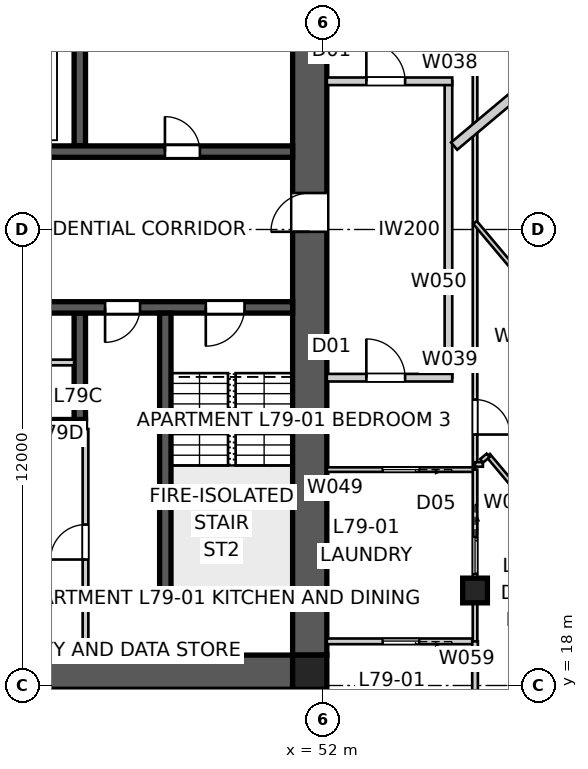
"""IFC4 building model, lengths in metres.
Left out: names, types, materials, properties, quantities, classifications, styles, units other than length and angle.
Written with IfcOpenShell. Run it as: python <this file> out.ifc"""

import sys

from ifc_helpers import new_model, si_unit, direction, frame, frame_2d, origin, origin_2d, place, context, subcontext, project, spatial, polyline, rectangle, outline, extrude, element, fill, save


model = new_model("IFC4")
c1 = context("Model", 3, precision=1e-05, world=origin(), true_north=direction((0.0, 1.0)))
c2 = subcontext(c1, "Body", "Model", "MODEL_VIEW")
j1 = project(units=[si_unit("LENGTHUNIT", "METRE"), si_unit("PLANEANGLEUNIT", "RADIAN")], contexts=[c1])
p1 = place(None, origin())
s1 = spatial("IfcSite", under=j1, at=p1, CompositionType="ELEMENT")
p2 = place(p1, origin())
s2 = spatial("IfcBuilding", under=s1, at=p2, CompositionType="ELEMENT")
p3 = place(p2, frame((0.0, 0.0, 286.2)))
s3 = spatial("IfcBuildingStorey", under=s2, at=p3, CompositionType="ELEMENT", Elevation=286.2)
p4 = place(p3, frame((51.2, 18.35, 0.0), z_axis=(0.0, 0.0, 1.0), x_axis=(-1.0, 0.0, 0.0)))
e1 = element("IfcWall", 1, at=p4, inside=s3, PredefinedType="SHEAR", context=c2, shape_type="SweptSolid", body=[
    extrude(outline(polyline([(0.0, -0.45), (22.4, -0.45), (22.4, -0.025), (22.85, -0.025), (22.85, 0.025), (22.4, 0.025), (22.4, 0.45), (0.0, 0.45), (0.0, 0.025), (-0.45, 0.025), (-0.45, -0.025), (0.0, -0.025), (0.0, -0.45)])), origin(), (0.0, 0.0, 1.0), 3.4),
])
p5 = place(p3, frame((51.65, 18.8, 0.0), z_axis=(0.0, 0.0, 1.0), x_axis=(0.0, 1.0, 0.0)))
e2 = element("IfcWall", 2, at=p5, inside=s3, PredefinedType="SHEAR", context=c2, shape_type="SweptSolid", body=[
    extrude(outline(polyline([(0.0, -0.45), (22.4, -0.45), (22.4, -0.025), (22.85, -0.025), (22.85, 0.025), (22.4, 0.025), (22.4, 0.45), (0.0, 0.45), (0.0, 0.025), (-0.45, 0.025), (-0.45, -0.025), (0.0, -0.025), (0.0, -0.45)])), origin(), (0.0, 0.0, 1.0), 3.4),
])
p6 = place(p5, frame((11.14, 0.0, 0.0)))
e3 = element("IfcOpeningElement", 3, at=p6, cuts=e2, PredefinedType="OPENING", context=c2, shape_type="SweptSolid", body=[
    extrude(rectangle(XDim=1.02, YDim=2.4, at=frame_2d((0.51, 1.2))), frame((0.0, 0.46, 0.0), z_axis=(0.0, -1.0, 0.0), x_axis=(1.0, 0.0, 0.0)), (0.0, 0.0, 1.0), 0.92),
])
p7 = place(p3, frame((28.8, 32.05, 0.0), z_axis=(0.0, 0.0, 1.0), x_axis=(1.0, 0.0, 0.0)))
e4 = element("IfcWall", 4, at=p7, inside=s3, PredefinedType="SHEAR", context=c2, shape_type="SweptSolid", body=[
    extrude(rectangle(XDim=22.4, YDim=0.3, at=frame_2d((11.2, 0.0))), origin(), (0.0, 0.0, 1.0), 3.4),
])
p8 = place(p7, frame((19.04, 0.0, 0.0)))
e5 = element("IfcOpeningElement", 5, at=p8, cuts=e4, PredefinedType="OPENING", context=c2, shape_type="SweptSolid", body=[
    extrude(rectangle(XDim=0.92, YDim=2.1, at=frame_2d((0.46, 1.05))), frame((0.0, 0.16, 0.0), z_axis=(0.0, -1.0, 0.0), x_axis=(1.0, 0.0, 0.0)), (0.0, 0.0, 1.0), 0.32),
])
p9 = place(p7, frame((1.265, 0.0, 0.0)))
e6 = element("IfcOpeningElement", 6, at=p9, cuts=e4, PredefinedType="OPENING", context=c2, shape_type="SweptSolid", body=[
    extrude(rectangle(XDim=1.02, YDim=2.1, at=frame_2d((0.51, 1.05))), frame((0.0, 0.16, 0.0), z_axis=(0.0, -1.0, 0.0), x_axis=(1.0, 0.0, 0.0)), (0.0, 0.0, 1.0), 0.32),
])
p10 = place(p7, frame((4.015, 0.0, 0.0)))
e7 = element("IfcOpeningElement", 7, at=p10, cuts=e4, PredefinedType="OPENING", context=c2, shape_type="SweptSolid", body=[
    extrude(rectangle(XDim=0.92, YDim=2.1, at=frame_2d((0.46, 1.05))), frame((0.0, 0.16, 0.0), z_axis=(0.0, -1.0, 0.0), x_axis=(1.0, 0.0, 0.0)), (0.0, 0.0, 1.0), 0.32),
])
p11 = place(p7, frame((6.115, 0.0, 0.0)))
e8 = element("IfcOpeningElement", 8, at=p11, cuts=e4, PredefinedType="OPENING", context=c2, shape_type="SweptSolid", body=[
    extrude(rectangle(XDim=0.92, YDim=2.1, at=frame_2d((0.46, 1.05))), frame((0.0, 0.16, 0.0), z_axis=(0.0, -1.0, 0.0), x_axis=(1.0, 0.0, 0.0)), (0.0, 0.0, 1.0), 0.32),
])
p12 = place(p7, frame((9.79, 0.0, 0.0)))
e9 = element("IfcOpeningElement", 9, at=p12, cuts=e4, PredefinedType="OPENING", context=c2, shape_type="SweptSolid", body=[
    extrude(rectangle(XDim=0.92, YDim=2.1, at=frame_2d((0.46, 1.05))), frame((0.0, 0.16, 0.0), z_axis=(0.0, -1.0, 0.0), x_axis=(1.0, 0.0, 0.0)), (0.0, 0.0, 1.0), 0.32),
])
p13 = place(p7, frame((12.05, 0.0, 0.0)))
e10 = element("IfcOpeningElement", 10, at=p13, cuts=e4, PredefinedType="OPENING", context=c2, shape_type="SweptSolid", body=[
    extrude(rectangle(XDim=1.1, YDim=2.1, at=frame_2d((0.55, 1.05))), frame((0.0, 0.16, 0.0), z_axis=(0.0, -1.0, 0.0), x_axis=(1.0, 0.0, 0.0)), (0.0, 0.0, 1.0), 0.32),
])
p14 = place(p7, frame((14.85, 0.0, 0.0)))
e11 = element("IfcOpeningElement", 11, at=p14, cuts=e4, PredefinedType="OPENING", context=c2, shape_type="SweptSolid", body=[
    extrude(rectangle(XDim=1.1, YDim=2.1, at=frame_2d((0.55, 1.05))), frame((0.0, 0.16, 0.0), z_axis=(0.0, -1.0, 0.0), x_axis=(1.0, 0.0, 0.0)), (0.0, 0.0, 1.0), 0.32),
])
p15 = place(p3, frame((51.2, 27.95, 0.0), z_axis=(0.0, 0.0, 1.0), x_axis=(-1.0, 0.0, 0.0)))
e12 = element("IfcWall", 12, at=p15, inside=s3, PredefinedType="SHEAR", context=c2, shape_type="SweptSolid", body=[
    extrude(rectangle(XDim=22.4, YDim=0.3, at=frame_2d((11.2, 0.0))), origin(), (0.0, 0.0, 1.0), 3.4),
])
p16 = place(p15, frame((19.04, 0.0, 0.0)))
e13 = element("IfcOpeningElement", 13, at=p16, cuts=e12, PredefinedType="OPENING", context=c2, shape_type="SweptSolid", body=[
    extrude(rectangle(XDim=0.92, YDim=2.1, at=frame_2d((0.46, 1.05))), frame((0.0, 0.16, 0.0), z_axis=(0.0, -1.0, 0.0), x_axis=(1.0, 0.0, 0.0)), (0.0, 0.0, 1.0), 0.32),
])
p17 = place(p15, frame((1.265, 0.0, 0.0)))
e14 = element("IfcOpeningElement", 14, at=p17, cuts=e12, PredefinedType="OPENING", context=c2, shape_type="SweptSolid", body=[
    extrude(rectangle(XDim=1.02, YDim=2.1, at=frame_2d((0.51, 1.05))), frame((0.0, 0.16, 0.0), z_axis=(0.0, -1.0, 0.0), x_axis=(1.0, 0.0, 0.0)), (0.0, 0.0, 1.0), 0.32),
])
p18 = place(p15, frame((4.015, 0.0, 0.0)))
e15 = element("IfcOpeningElement", 15, at=p18, cuts=e12, PredefinedType="OPENING", context=c2, shape_type="SweptSolid", body=[
    extrude(rectangle(XDim=0.92, YDim=2.1, at=frame_2d((0.46, 1.05))), frame((0.0, 0.16, 0.0), z_axis=(0.0, -1.0, 0.0), x_axis=(1.0, 0.0, 0.0)), (0.0, 0.0, 1.0), 0.32),
])
p19 = place(p15, frame((9.34, 0.0, 0.0)))
e16 = element("IfcOpeningElement", 16, at=p19, cuts=e12, PredefinedType="OPENING", context=c2, shape_type="SweptSolid", body=[
    extrude(rectangle(XDim=0.92, YDim=2.1, at=frame_2d((0.46, 1.05))), frame((0.0, 0.16, 0.0), z_axis=(0.0, -1.0, 0.0), x_axis=(1.0, 0.0, 0.0)), (0.0, 0.0, 1.0), 0.32),
])
p20 = place(p15, frame((7.015, 0.0, 0.0)))
e17 = element("IfcOpeningElement", 17, at=p20, cuts=e12, PredefinedType="OPENING", context=c2, shape_type="SweptSolid", body=[
    extrude(rectangle(XDim=0.92, YDim=2.1, at=frame_2d((0.46, 1.05))), frame((0.0, 0.16, 0.0), z_axis=(0.0, -1.0, 0.0), x_axis=(1.0, 0.0, 0.0)), (0.0, 0.0, 1.0), 0.32),
])
p21 = place(p15, frame((12.05, 0.0, 0.0)))
e18 = element("IfcOpeningElement", 18, at=p21, cuts=e12, PredefinedType="OPENING", context=c2, shape_type="SweptSolid", body=[
    extrude(rectangle(XDim=1.1, YDim=2.1, at=frame_2d((0.55, 1.05))), frame((0.0, 0.16, 0.0), z_axis=(0.0, -1.0, 0.0), x_axis=(1.0, 0.0, 0.0)), (0.0, 0.0, 1.0), 0.32),
])
p22 = place(p15, frame((14.85, 0.0, 0.0)))
e19 = element("IfcOpeningElement", 19, at=p22, cuts=e12, PredefinedType="OPENING", context=c2, shape_type="SweptSolid", body=[
    extrude(rectangle(XDim=1.1, YDim=2.1, at=frame_2d((0.55, 1.05))), frame((0.0, 0.16, 0.0), z_axis=(0.0, -1.0, 0.0), x_axis=(1.0, 0.0, 0.0)), (0.0, 0.0, 1.0), 0.32),
])
p23 = place(p3, frame((45.75, 24.85, 0.0), z_axis=(0.0, 0.0, 1.0), x_axis=(-1.0, 0.0, 0.0)))
e20 = element("IfcWall", 20, at=p23, inside=s3, PredefinedType="SHEAR", context=c2, shape_type="SweptSolid", body=[
    extrude(rectangle(XDim=11.5, YDim=0.3, at=frame_2d((5.75, 0.0))), origin(), (0.0, 0.0, 1.0), 3.4),
])
for number, where, z_axis, x_axis in (
    (21, (45.6, 27.8, 0.0), (0.0, 0.0, 1.0), (0.0, -1.0, 0.0)),
    (22, (45.6, 32.2, 0.0), (0.0, 0.0, 1.0), (0.0, 1.0, 0.0)),
):
    element("IfcWall", number, at=place(p3, frame(where, z_axis=z_axis, x_axis=x_axis)), inside=s3, PredefinedType="SHEAR", context=c2, shape_type="SweptSolid", body=[
        extrude(rectangle(XDim=2.8, YDim=0.3, at=frame_2d((1.4, 0.0))), origin(), (0.0, 0.0, 1.0), 3.4),
    ])
p24 = place(p3, frame((47.85, 27.8, 0.0), z_axis=(0.0, 0.0, 1.0), x_axis=(0.0, -1.0, 0.0)))
e23 = element("IfcWall", 23, at=p24, inside=s3, PredefinedType="SHEAR", context=c2, shape_type="SweptSolid", body=[
    extrude(rectangle(XDim=7.7, YDim=0.3, at=frame_2d((3.85, 0.0))), origin(), (0.0, 0.0, 1.0), 3.4),
])
p25 = place(p3, frame((51.2, 20.25, 0.0), z_axis=(0.0, 0.0, 1.0), x_axis=(-1.0, 0.0, 0.0)))
e24 = element("IfcWall", 24, at=p25, inside=s3, PredefinedType="SHEAR", context=c2, shape_type="SweptSolid", body=[
    extrude(rectangle(XDim=3.5, YDim=0.3, at=frame_2d((1.75, 0.0))), origin(), (0.0, 0.0, 1.0), 3.4),
])
p26 = place(p3, frame((51.65, 18.35, 0.0), z_axis=(0.0, 0.0, 1.0), x_axis=(1.0, 0.0, 0.0)))
e25 = element("IfcColumn", 25, at=p26, inside=s3, PredefinedType="COLUMN", context=c2, shape_type="SweptSolid", body=[
    extrude(rectangle(XDim=0.9, YDim=0.9, at=origin_2d()), origin(), (0.0, 0.0, 1.0), 3.4),
])
p27 = place(p3, frame((56.0, 20.5, 0.0), z_axis=(0.0, 0.0, 1.0), x_axis=(1.0, 0.0, 0.0)))
e26 = element("IfcColumn", 26, at=p27, inside=s3, PredefinedType="COLUMN", context=c2, shape_type="SweptSolid", body=[
    extrude(rectangle(XDim=0.65, YDim=0.65, at=origin_2d()), origin(), (0.0, 0.0, 1.0), 3.4),
])
p28 = place(p3, frame((55.3, 26.1, 0.0), z_axis=(0.0, 0.0, 1.0), x_axis=(0.0, 1.0, 0.0)))
e27 = element("IfcWall", 27, at=p28, inside=s3, PredefinedType="PARTITIONING", context=c2, shape_type="SweptSolid", body=[
    extrude(rectangle(XDim=7.8, YDim=0.2, at=frame_2d((3.9, 0.0))), origin(), (0.0, 0.0, 1.0), 3.25),
])
p29 = place(p3, frame((52.1, 33.9, 0.0), z_axis=(0.0, 0.0, 1.0), x_axis=(1.0, 0.0, 0.0)))
e28 = element("IfcWall", 28, at=p29, inside=s3, PredefinedType="PARTITIONING", context=c2, shape_type="SweptSolid", body=[
    extrude(rectangle(XDim=3.3, YDim=0.2, at=frame_2d((1.65, 0.0))), origin(), (0.0, 0.0, 1.0), 3.25),
])
p30 = place(p29, frame((1.04, 0.0, 0.0)))
e29 = element("IfcOpeningElement", 29, at=p30, cuts=e28, PredefinedType="OPENING", context=c2, shape_type="SweptSolid", body=[
    extrude(rectangle(XDim=1.02, YDim=2.34, at=frame_2d((0.51, 1.17))), frame((0.0, 0.11, 0.0), z_axis=(0.0, -1.0, 0.0), x_axis=(1.0, 0.0, 0.0)), (0.0, 0.0, 1.0), 0.22),
])
p31 = place(p3, frame((52.1, 26.1, 0.0), z_axis=(0.0, 0.0, 1.0), x_axis=(1.0, 0.0, 0.0)))
e30 = element("IfcWall", 30, at=p31, inside=s3, PredefinedType="PARTITIONING", context=c2, shape_type="SweptSolid", body=[
    extrude(rectangle(XDim=3.3, YDim=0.2, at=frame_2d((1.65, 0.0))), origin(), (0.0, 0.0, 1.0), 3.25),
])
p32 = place(p31, frame((1.04, 0.0, 0.0)))
e31 = element("IfcOpeningElement", 31, at=p32, cuts=e30, PredefinedType="OPENING", context=c2, shape_type="SweptSolid", body=[
    extrude(rectangle(XDim=1.02, YDim=2.34, at=frame_2d((0.51, 1.17))), frame((0.0, 0.11, 0.0), z_axis=(0.0, -1.0, 0.0), x_axis=(1.0, 0.0, 0.0)), (0.0, 0.0, 1.0), 0.22),
])
p33 = place(p3, frame((61.007, 36.857, 0.0), z_axis=(0.0, 0.0, 1.0), x_axis=(-0.766054150891, -0.642776040237, 0.0)))
e32 = element("IfcWall", 32, at=p33, inside=s3, PredefinedType="PARTITIONING", context=c2, shape_type="SweptSolid", body=[
    extrude(rectangle(XDim=7.254, YDim=0.25, at=frame_2d((3.627, 0.0))), origin(), (0.0, 0.0, 1.0), 3.25),
])
p34 = place(p3, frame((45.75, 18.8, 0.0), z_axis=(0.0, 0.0, 1.0), x_axis=(0.0, 1.0, 0.0)))
e33 = element("IfcWall", 33, at=p34, inside=s3, PredefinedType="SOLIDWALL", context=c2, shape_type="SweptSolid", body=[
    extrude(rectangle(XDim=5.95, YDim=0.15, at=frame_2d((2.975, 0.0))), origin(), (0.0, 0.0, 1.0), 3.25),
])
p35 = place(p34, frame((2.515, 0.0, 0.0)))
e34 = element("IfcOpeningElement", 34, at=p35, cuts=e33, PredefinedType="OPENING", context=c2, shape_type="SweptSolid", body=[
    extrude(rectangle(XDim=0.92, YDim=2.1, at=frame_2d((0.46, 1.05))), frame((0.0, 0.085, 0.0), z_axis=(0.0, -1.0, 0.0), x_axis=(1.0, 0.0, 0.0)), (0.0, 0.0, 1.0), 0.17),
])
p36 = place(p3, frame((56.0, 23.681, 0.0), z_axis=(0.0, 0.0, 1.0), x_axis=(-1.0, 0.0, 0.0)))
e35 = element("IfcWall", 35, at=p36, inside=s3, PredefinedType="PARTITIONING", context=c2, shape_type="SweptSolid", body=[
    extrude(rectangle(XDim=3.9, YDim=0.12, at=frame_2d((1.95, 0.0))), origin(), (0.0, 0.0, 1.0), 3.25),
])
p37 = place(p36, frame((1.47, 0.0, 0.0)))
e36 = element("IfcOpeningElement", 36, at=p37, cuts=e35, PredefinedType="OPENING", context=c2, shape_type="SweptSolid", body=[
    extrude(rectangle(XDim=0.96, YDim=2.1, at=frame_2d((0.48, 1.05))), frame((0.0, 0.07, 0.0), z_axis=(0.0, -1.0, 0.0), x_axis=(1.0, 0.0, 0.0)), (0.0, 0.0, 1.0), 0.14),
])
p38 = place(p3, frame((56.0, 42.762, 0.0), z_axis=(0.0, 0.0, 1.0), x_axis=(0.0, -1.0, 0.0)))
e37 = element("IfcWall", 37, at=p38, inside=s3, PredefinedType="PARTITIONING", context=c2, shape_type="SweptSolid", body=[
    extrude(rectangle(XDim=18.995, YDim=0.12, at=frame_2d((9.498, 0.0))), origin(), (0.0, 0.0, 1.0), 2.55),
])
p39 = place(p38, frame((17.238, 0.0, 0.0)))
e38 = element("IfcOpeningElement", 38, at=p39, cuts=e37, PredefinedType="OPENING", context=c2, shape_type="SweptSolid", body=[
    extrude(rectangle(XDim=0.92, YDim=2.34, at=frame_2d((0.46, 1.17))), frame((0.0, 0.07, 0.0), z_axis=(0.0, -1.0, 0.0), x_axis=(1.0, 0.0, 0.0)), (0.0, 0.0, 1.0), 0.14),
])
p40 = place(p38, frame((6.017, 0.0, 0.0)))
e39 = element("IfcOpeningElement", 39, at=p40, cuts=e37, PredefinedType="OPENING", context=c2, shape_type="SweptSolid", body=[
    extrude(rectangle(XDim=0.92, YDim=2.34, at=frame_2d((0.46, 1.17))), frame((0.0, 0.07, 0.0), z_axis=(0.0, -1.0, 0.0), x_axis=(1.0, 0.0, 0.0)), (0.0, 0.0, 1.0), 0.14),
])
p41 = place(p3, frame((56.0, 19.162, 0.0), z_axis=(0.0, 0.0, 1.0), x_axis=(-1.0, 0.0, 0.0)))
e40 = element("IfcWall", 40, at=p41, inside=s3, PredefinedType="SOLIDWALL", context=c2, shape_type="SweptSolid", body=[
    extrude(rectangle(XDim=3.9, YDim=0.15, at=frame_2d((1.95, 0.0))), origin(), (0.0, 0.0, 1.0), 3.25),
])
p42 = place(p41, frame((1.47, 0.0, 0.0)))
e41 = element("IfcOpeningElement", 41, at=p42, cuts=e40, PredefinedType="OPENING", context=c2, shape_type="SweptSolid", body=[
    extrude(rectangle(XDim=0.96, YDim=2.1, at=frame_2d((0.48, 1.05))), frame((0.0, 0.085, 0.0), z_axis=(0.0, -1.0, 0.0), x_axis=(1.0, 0.0, 0.0)), (0.0, 0.0, 1.0), 0.17),
])
p43 = place(p3, frame((56.0, 23.681, 0.0), z_axis=(0.0, 0.0, 1.0), x_axis=(0.0, -1.0, 0.0)))
e42 = element("IfcWall", 42, at=p43, inside=s3, PredefinedType="PARTITIONING", context=c2, shape_type="SweptSolid", body=[
    extrude(rectangle(XDim=4.519, YDim=0.12, at=frame_2d((2.26, 0.0))), origin(), (0.0, 0.0, 1.0), 2.55),
])
p44 = place(p43, frame((1.78, 0.0, 0.0)))
e43 = element("IfcOpeningElement", 43, at=p44, cuts=e42, PredefinedType="OPENING", context=c2, shape_type="SweptSolid", body=[
    extrude(rectangle(XDim=0.96, YDim=2.1, at=frame_2d((0.48, 1.05))), frame((0.0, 0.07, 0.0), z_axis=(0.0, -1.0, 0.0), x_axis=(1.0, 0.0, 0.0)), (0.0, 0.0, 1.0), 0.14),
])
p45 = place(p3, frame((56.0, 19.162, 0.0), z_axis=(0.0, 0.0, 1.0), x_axis=(0.0, -1.0, 0.0)))
e44 = element("IfcWall", 44, at=p45, inside=s3, PredefinedType="SOLIDWALL", context=c2, shape_type="SweptSolid", body=[
    extrude(rectangle(XDim=2.445, YDim=0.15, at=frame_2d((1.222, 0.0))), origin(), (0.0, 0.0, 1.0), 3.25),
])
p46 = place(p3, frame((62.631, 22.281, 0.0), z_axis=(0.0, 0.0, 1.0), x_axis=(-0.64277851249, 0.766052076481, 0.0)))
e45 = element("IfcWall", 45, at=p46, inside=s3, PredefinedType="PARTITIONING", context=c2, shape_type="SweptSolid", body=[
    extrude(rectangle(XDim=10.316, YDim=0.12, at=frame_2d((5.158, 0.0))), origin(), (0.0, 0.0, 1.0), 3.25),
])
p47 = place(p46, frame((4.962, 0.0, 0.0)))
e46 = element("IfcOpeningElement", 46, at=p47, cuts=e45, PredefinedType="OPENING", context=c2, shape_type="SweptSolid", body=[
    extrude(rectangle(XDim=0.92, YDim=2.34, at=frame_2d((0.46, 1.17))), frame((0.0, 0.07, 0.0), z_axis=(0.0, -1.0, 0.0), x_axis=(1.0, 0.0, 0.0)), (0.0, 0.0, 1.0), 0.14),
])
p48 = place(p46, frame((1.525, 0.0, 0.0)))
e47 = element("IfcOpeningElement", 47, at=p48, cuts=e45, PredefinedType="OPENING", context=c2, shape_type="SweptSolid", body=[
    extrude(rectangle(XDim=0.92, YDim=2.34, at=frame_2d((0.46, 1.17))), frame((0.0, 0.07, 0.0), z_axis=(0.0, -1.0, 0.0), x_axis=(1.0, 0.0, 0.0)), (0.0, 0.0, 1.0), 0.14),
])
p49 = place(p3, frame((59.816, 19.919, 0.0), z_axis=(0.0, 0.0, 1.0), x_axis=(-0.642773197476, 0.766056536168, 0.0)))
e48 = element("IfcWall", 48, at=p49, inside=s3, PredefinedType="PARTITIONING", context=c2, shape_type="SweptSolid", body=[
    extrude(rectangle(XDim=5.4, YDim=0.12, at=frame_2d((2.7, 0.0))), origin(), (0.0, 0.0, 1.0), 3.25),
])
p50 = place(p3, frame((56.345, 24.056, 0.0), z_axis=(0.0, 0.0, 1.0), x_axis=(-0.766260492227, -0.642530044474, 0.0)))
e49 = element("IfcWall", 49, at=p50, inside=s3, PredefinedType="PARTITIONING", context=c2, shape_type="SweptSolid", body=[
    extrude(rectangle(XDim=0.225, YDim=0.12, at=frame_2d((0.112, 0.0))), origin(), (0.0, 0.0, 1.0), 3.25),
])
p51 = place(p3, frame((56.207, 23.817, 0.0), z_axis=(0.0, 0.0, 1.0), x_axis=(-1.0, 0.0, 0.0)))
e50 = element("IfcWall", 50, at=p51, inside=s3, PredefinedType="PARTITIONING", context=c2, shape_type="SweptSolid", body=[
    extrude(rectangle(XDim=0.207, YDim=0.12, at=frame_2d((0.104, 0.0))), origin(), (0.0, 0.0, 1.0), 3.25),
])
p52 = place(p3, frame((51.625, 17.9, 0.0), z_axis=(0.0, 0.0, 1.0), x_axis=(0.027925096799, 0.999610018442, 0.0)))
e51 = element("IfcWall", 51, at=p52, inside=s3, PredefinedType="SOLIDWALL", context=c2, shape_type="SweptSolid", body=[
    extrude(rectangle(XDim=0.9, YDim=0.15, at=frame_2d((0.45, 0.0))), origin(), (0.0, 0.0, 1.0), 3.25),
])
p53 = place(p3, frame((40.1, 26.5, 0.0), z_axis=(0.0, 0.0, 1.0), x_axis=(1.0, 0.0, 0.0)))
e52 = element("IfcWall", 52, at=p53, inside=s3, PredefinedType="SOLIDWALL", context=c2, shape_type="SweptSolid", body=[
    extrude(rectangle(XDim=5.35, YDim=0.15, at=frame_2d((2.675, 0.0))), origin(), (0.0, 0.0, 1.0), 3.25),
])
p54 = place(p53, frame((2.215, 0.0, 0.0)))
e53 = element("IfcOpeningElement", 53, at=p54, cuts=e52, PredefinedType="OPENING", context=c2, shape_type="SweptSolid", body=[
    extrude(rectangle(XDim=0.92, YDim=2.1, at=frame_2d((0.46, 1.05))), frame((0.0, 0.085, 0.0), z_axis=(0.0, -1.0, 0.0), x_axis=(1.0, 0.0, 0.0)), (0.0, 0.0, 1.0), 0.17),
])
p55 = place(p8, origin())
e54 = element("IfcDoor", 54, at=p55, inside=s3, OperationType="SINGLE_SWING_LEFT", PredefinedType="DOOR", context=c2, shape_type="SweptSolid", body=[
    extrude(rectangle(XDim=0.92, YDim=2.1, at=frame_2d((0.46, 1.05))), frame((0.0, 0.025, 0.0), z_axis=(0.0, -1.0, 0.0), x_axis=(1.0, 0.0, 0.0)), (0.0, 0.0, 1.0), 0.05),
])
fill(e5, e54)
p56 = place(p17, origin())
e55 = element("IfcDoor", 55, at=p56, inside=s3, OperationType="SINGLE_SWING_RIGHT", PredefinedType="DOOR", context=c2, shape_type="SweptSolid", body=[
    extrude(rectangle(XDim=1.02, YDim=2.1, at=frame_2d((0.51, 1.05))), frame((0.0, 0.025, 0.0), z_axis=(0.0, -1.0, 0.0), x_axis=(1.0, 0.0, 0.0)), (0.0, 0.0, 1.0), 0.05),
])
fill(e14, e55)
p57 = place(p18, origin())
e56 = element("IfcDoor", 56, at=p57, inside=s3, OperationType="SINGLE_SWING_RIGHT", PredefinedType="DOOR", context=c2, shape_type="SweptSolid", body=[
    extrude(rectangle(XDim=0.92, YDim=2.1, at=frame_2d((0.46, 1.05))), frame((0.0, 0.025, 0.0), z_axis=(0.0, -1.0, 0.0), x_axis=(1.0, 0.0, 0.0)), (0.0, 0.0, 1.0), 0.05),
])
fill(e15, e56)
p58 = place(p32, origin())
e57 = element("IfcDoor", 57, at=p58, inside=s3, OperationType="SINGLE_SWING_LEFT", PredefinedType="DOOR", context=c2, shape_type="SweptSolid", body=[
    extrude(rectangle(XDim=1.02, YDim=2.34, at=frame_2d((0.51, 1.17))), frame((0.0, 0.025, 0.0), z_axis=(0.0, -1.0, 0.0), x_axis=(1.0, 0.0, 0.0)), (0.0, 0.0, 1.0), 0.05),
])
fill(e31, e57)
p59 = place(p30, origin())
e58 = element("IfcDoor", 58, at=p59, inside=s3, OperationType="SINGLE_SWING_LEFT", PredefinedType="DOOR", context=c2, shape_type="SweptSolid", body=[
    extrude(rectangle(XDim=1.02, YDim=2.34, at=frame_2d((0.51, 1.17))), frame((0.0, 0.025, 0.0), z_axis=(0.0, -1.0, 0.0), x_axis=(1.0, 0.0, 0.0)), (0.0, 0.0, 1.0), 0.05),
])
fill(e29, e58)
p60 = place(p35, origin())
e59 = element("IfcDoor", 59, at=p60, inside=s3, OperationType="SINGLE_SWING_LEFT", PredefinedType="DOOR", context=c2, shape_type="SweptSolid", body=[
    extrude(rectangle(XDim=0.92, YDim=2.1, at=frame_2d((0.46, 1.05))), frame((0.0, 0.025, 0.0), z_axis=(0.0, -1.0, 0.0), x_axis=(1.0, 0.0, 0.0)), (0.0, 0.0, 1.0), 0.05),
])
fill(e34, e59)
p61 = place(p39, origin())
e60 = element("IfcDoor", 60, at=p61, inside=s3, OperationType="SINGLE_SWING_RIGHT", PredefinedType="DOOR", context=c2, shape_type="SweptSolid", body=[
    extrude(rectangle(XDim=0.92, YDim=2.34, at=frame_2d((0.46, 1.17))), frame((0.0, 0.025, 0.0), z_axis=(0.0, -1.0, 0.0), x_axis=(1.0, 0.0, 0.0)), (0.0, 0.0, 1.0), 0.05),
])
fill(e38, e60)
p62 = place(p37, origin())
e61 = element("IfcDoor", 61, at=p62, inside=s3, OperationType="SLIDING_TO_LEFT", PredefinedType="DOOR", context=c2, shape_type="SweptSolid", body=[
    extrude(rectangle(XDim=0.96, YDim=2.1, at=frame_2d((0.48, 1.05))), frame((0.0, 0.025, 0.0), z_axis=(0.0, -1.0, 0.0), x_axis=(1.0, 0.0, 0.0)), (0.0, 0.0, 1.0), 0.05),
])
fill(e36, e61)
p63 = place(p44, origin())
e62 = element("IfcDoor", 62, at=p63, inside=s3, OperationType="SLIDING_TO_LEFT", PredefinedType="DOOR", context=c2, shape_type="SweptSolid", body=[
    extrude(rectangle(XDim=0.96, YDim=2.1, at=frame_2d((0.48, 1.05))), frame((0.0, 0.025, 0.0), z_axis=(0.0, -1.0, 0.0), x_axis=(1.0, 0.0, 0.0)), (0.0, 0.0, 1.0), 0.05),
])
fill(e43, e62)
p64 = place(p42, origin())
e63 = element("IfcDoor", 63, at=p64, inside=s3, OperationType="SLIDING_TO_LEFT", PredefinedType="DOOR", context=c2, shape_type="SweptSolid", body=[
    extrude(rectangle(XDim=0.96, YDim=2.1, at=frame_2d((0.48, 1.05))), frame((0.0, 0.025, 0.0), z_axis=(0.0, -1.0, 0.0), x_axis=(1.0, 0.0, 0.0)), (0.0, 0.0, 1.0), 0.05),
])
fill(e41, e63)
p65 = place(p6, origin())
e64 = element("IfcDoor", 64, at=p65, inside=s3, OperationType="SINGLE_SWING_LEFT", PredefinedType="DOOR", context=c2, shape_type="SweptSolid", body=[
    extrude(rectangle(XDim=1.02, YDim=2.4, at=frame_2d((0.51, 1.2))), frame((0.0, 0.025, 0.0), z_axis=(0.0, -1.0, 0.0), x_axis=(1.0, 0.0, 0.0)), (0.0, 0.0, 1.0), 0.05),
])
fill(e3, e64)
save(model, sys.argv[1])
